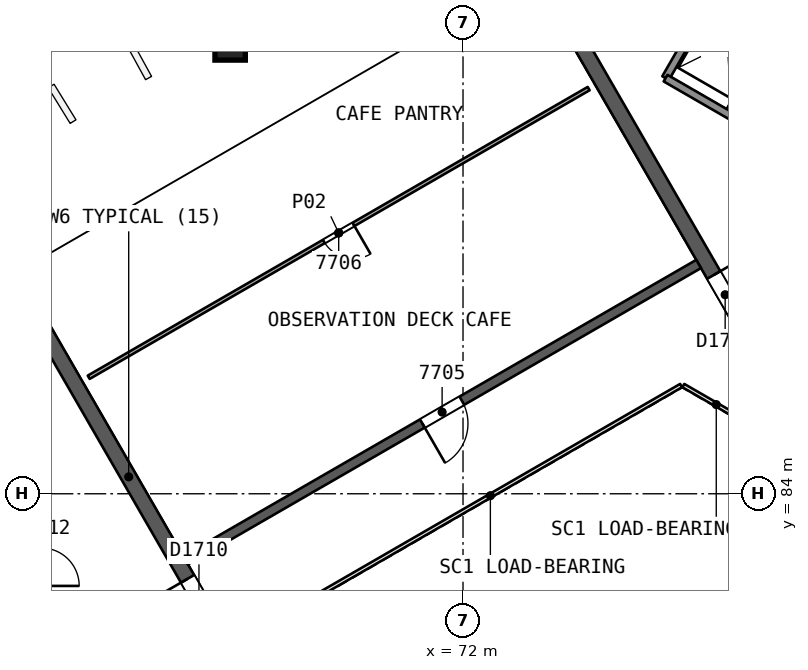
"""IFC4 building model, lengths in metres.
Left out: names, types, materials, properties, quantities, classifications, styles, units other than length and angle.
Written with IfcOpenShell. Run it as: python <this file> out.ifc"""

import sys

from ifc_helpers import new_model, si_unit, direction, frame, frame_2d, origin, origin_2d, place, context, subcontext, project, spatial, rectangle, extrude, element, fill, save


model = new_model("IFC4")
c1 = context("Model", 3, precision=1e-05, world=origin(), true_north=direction((0.0, 1.0)))
c2 = subcontext(c1, "Body", "Model", "MODEL_VIEW")
j1 = project(units=[si_unit("LENGTHUNIT", "METRE"), si_unit("PLANEANGLEUNIT", "RADIAN")], contexts=[c1])
p1 = place(None, origin())
s1 = spatial("IfcSite", under=j1, at=p1, CompositionType="ELEMENT")
p2 = place(p1, origin())
s2 = spatial("IfcBuilding", under=s1, at=p2, CompositionType="ELEMENT")
p3 = place(p2, frame((0.0, 0.0, 315.8)))
s3 = spatial("IfcBuildingStorey", under=s2, at=p3, CompositionType="ELEMENT", Elevation=315.8)
p4 = place(p3, frame((65.769, 80.0, 0.0), z_axis=(0.0, 0.0, 1.0), x_axis=(-0.50000177223, 0.866024380585, 0.0)))
e1 = element("IfcWall", 1, at=p4, inside=s3, PredefinedType="SHEAR", context=c2, shape_type="SweptSolid", body=[
    extrude(rectangle(XDim=10.265, YDim=0.4, at=frame_2d((5.132, 0.0))), origin(), (0.0, 0.0, 1.0), 6.2),
])
p5 = place(p4, frame((0.834, 0.0, 0.0)))
e2 = element("IfcOpeningElement", 2, at=p5, cuts=e1, PredefinedType="OPENING", context=c2, shape_type="SweptSolid", body=[
    extrude(rectangle(XDim=1.2, YDim=2.1, at=frame_2d((0.6, 1.05))), frame((0.0, 0.21, 0.0), z_axis=(0.0, -1.0, 0.0), x_axis=(1.0, 0.0, 0.0)), (0.0, 0.0, 1.0), 0.421),
])
p6 = place(p3, frame((74.583, 96.71, 0.0), z_axis=(0.0, 0.0, 1.0), x_axis=(0.499987488796, -0.866032627011, 0.0)))
e3 = element("IfcWall", 3, at=p6, inside=s3, PredefinedType="SHEAR", context=c2, shape_type="SweptSolid", body=[
    extrude(rectangle(XDim=10.18, YDim=0.4, at=frame_2d((5.09, 0.0))), origin(), (0.0, 0.0, 1.0), 6.2),
])
p7 = place(p6, frame((8.03, 0.0, 0.0)))
e4 = element("IfcOpeningElement", 4, at=p7, cuts=e3, PredefinedType="OPENING", context=c2, shape_type="SweptSolid", body=[
    extrude(rectangle(XDim=1.2, YDim=2.1, at=frame_2d((0.6, 1.05))), frame((0.0, 0.21, 0.0), z_axis=(0.0, -1.0, 0.0), x_axis=(1.0, 0.0, 0.0)), (0.0, 0.0, 1.0), 0.421),
])
p8 = place(p3, frame((78.2, 90.046, 0.0), z_axis=(0.0, 0.0, 1.0), x_axis=(-0.866026492143, -0.499998114903, 0.0)))
e5 = element("IfcWall", 5, at=p8, inside=s3, PredefinedType="SHEAR", context=c2, shape_type="SweptSolid", body=[
    extrude(rectangle(XDim=15.588, YDim=0.25, at=frame_2d((7.794, 0.0))), origin(), (0.0, 0.0, 1.0), 6.2),
])
p9 = place(p8, frame((7.194, 0.0, 0.0)))
e6 = element("IfcOpeningElement", 6, at=p9, cuts=e5, PredefinedType="OPENING", context=c2, shape_type="SweptSolid", body=[
    extrude(rectangle(XDim=1.2, YDim=2.4, at=frame_2d((0.6, 1.2))), frame((0.0, 0.135, 0.0), z_axis=(0.0, -1.0, 0.0), x_axis=(1.0, 0.0, 0.0)), (0.0, 0.0, 1.0), 0.271),
])
p10 = place(p3, frame((65.86, 95.831, 0.0), z_axis=(0.010064054513, -0.017499438071, 0.999796221474), x_axis=(-0.498436844032, 0.866690946639, 0.020187013797)))
e7 = element("IfcColumn", 7, at=p10, inside=s3, PredefinedType="COLUMN", context=c2, shape_type="SweptSolid", body=[
    extrude(rectangle(XDim=0.8, YDim=0.8, at=origin_2d()), origin(), (0.0, 0.0, 1.0), 6.501),
])
p11 = place(p3, frame((75.306, 94.661, 0.0), z_axis=(0.0, 0.0, 1.0), x_axis=(-0.866024999478, -0.500000700278, 0.0)))
e8 = element("IfcWall", 8, at=p11, inside=s3, PredefinedType="PARTITIONING", context=c2, shape_type="SweptSolid", body=[
    extrude(rectangle(XDim=15.19, YDim=0.1, at=frame_2d((7.595, 0.0))), origin(), (0.0, 0.0, 1.0), 6.2),
])
p12 = place(p11, frame((7.145, 0.0, 0.0)))
e9 = element("IfcOpeningElement", 9, at=p12, cuts=e8, PredefinedType="OPENING", context=c2, shape_type="SweptSolid", body=[
    extrude(rectangle(XDim=0.9, YDim=2.1, at=frame_2d((0.45, 1.05))), frame((0.0, 0.061, 0.0), z_axis=(0.0, -1.0, 0.0), x_axis=(1.0, 0.0, 0.0)), (0.0, 0.0, 1.0), 0.121),
])
for number, where, z_axis, x_axis in (
    (10, (78.976, 93.986, 0.0), (0.0, 0.0, 1.0), (0.5, 0.866, 0.0)),
    (11, (77.33, 94.936, 0.0), (0.0, 0.0, 1.0), (0.5, 0.866, 0.0)),
):
    element("IfcWall", number, at=place(p3, frame(where, z_axis=z_axis, x_axis=x_axis)), inside=s3, PredefinedType="SOLIDWALL", context=c2, shape_type="SweptSolid", body=[
        extrude(rectangle(XDim=3.05, YDim=0.2, at=frame_2d((1.525, 0.0))), origin(), (0.0, 0.0, 1.0), 6.2),
    ])
p13 = place(p3, frame((86.77, 89.486, 0.0), z_axis=(0.0, 0.0, 1.0), x_axis=(-0.86601811187, 0.500012629753, 0.0)))
e12 = element("IfcWall", 12, at=p13, inside=s3, PredefinedType="SOLIDWALL", context=c2, shape_type="SweptSolid", body=[
    extrude(rectangle(XDim=10.9, YDim=0.2, at=frame_2d((5.45, 0.0))), origin(), (0.0, 0.0, 1.0), 6.2),
])
p14 = place(p13, frame((0.625, 0.0, 0.0)))
e13 = element("IfcOpeningElement", 13, at=p14, cuts=e12, PredefinedType="OPENING", context=c2, shape_type="SweptSolid", body=[
    extrude(rectangle(XDim=1.0, YDim=2.1, at=frame_2d((0.5, 1.05))), frame((0.0, 0.11, 0.0), z_axis=(0.0, -1.0, 0.0), x_axis=(1.0, 0.0, 0.0)), (0.0, 0.0, 1.0), 0.221),
])
p15 = place(p13, frame((4.0, 0.0, 0.0)))
e14 = element("IfcOpeningElement", 14, at=p15, cuts=e12, PredefinedType="OPENING", context=c2, shape_type="SweptSolid", body=[
    extrude(rectangle(XDim=1.0, YDim=2.1, at=frame_2d((0.5, 1.05))), frame((0.0, 0.11, 0.0), z_axis=(0.0, -1.0, 0.0), x_axis=(1.0, 0.0, 0.0)), (0.0, 0.0, 1.0), 0.221),
])
p16 = place(p13, frame((7.375, 0.0, 0.0)))
e15 = element("IfcOpeningElement", 15, at=p16, cuts=e12, PredefinedType="OPENING", context=c2, shape_type="SweptSolid", body=[
    extrude(rectangle(XDim=1.0, YDim=2.1, at=frame_2d((0.5, 1.05))), frame((0.0, 0.11, 0.0), z_axis=(0.0, -1.0, 0.0), x_axis=(1.0, 0.0, 0.0)), (0.0, 0.0, 1.0), 0.221),
])
p17 = place(p3, frame((79.53, 85.846, 0.0), z_axis=(0.0, 0.0, 1.0), x_axis=(-0.866041268327, 0.499972520799, 0.0)))
e16 = element("IfcWall", 16, at=p17, inside=s3, PredefinedType="PARTITIONING", context=c2, shape_type="SweptSolid", body=[
    extrude(rectangle(XDim=2.0, YDim=0.1, at=frame_2d((1.0, 0.0))), origin(), (0.0, 0.0, 1.0), 6.2),
])
p18 = place(p3, frame((77.738, 86.846, 0.0), z_axis=(0.0, 0.0, 1.0), x_axis=(-0.866026658274, -0.499997827154, 0.0)))
e17 = element("IfcWall", 17, at=p18, inside=s3, PredefinedType="PARTITIONING", context=c2, shape_type="SweptSolid", body=[
    extrude(rectangle(XDim=11.588, YDim=0.1, at=frame_2d((5.794, 0.0))), origin(), (0.0, 0.0, 1.0), 6.2),
])
p19 = place(p9, origin())
e18 = element("IfcDoor", 18, at=p19, inside=s3, OperationType="SINGLE_SWING_RIGHT", PredefinedType="NOTDEFINED", context=c2, shape_type="SweptSolid", body=[
    extrude(rectangle(XDim=1.2, YDim=2.4, at=frame_2d((0.6, 1.2))), frame((0.0, 0.025, 0.0), z_axis=(0.0, -1.0, 0.0), x_axis=(1.0, 0.0, 0.0)), (0.0, 0.0, 1.0), 0.05),
])
fill(e6, e18)
p20 = place(p12, origin())
e19 = element("IfcDoor", 19, at=p20, inside=s3, OperationType="SINGLE_SWING_LEFT", PredefinedType="NOTDEFINED", context=c2, shape_type="SweptSolid", body=[
    extrude(rectangle(XDim=0.9, YDim=2.1, at=frame_2d((0.45, 1.05))), frame((0.0, 0.025, 0.0), z_axis=(0.0, -1.0, 0.0), x_axis=(1.0, 0.0, 0.0)), (0.0, 0.0, 1.0), 0.05),
])
fill(e9, e19)
p21 = place(p5, origin())
e20 = element("IfcDoor", 20, at=p21, inside=s3, OperationType="SINGLE_SWING_RIGHT", PredefinedType="NOTDEFINED", context=c2, shape_type="SweptSolid", body=[
    extrude(rectangle(XDim=1.2, YDim=2.1, at=frame_2d((0.6, 1.05))), frame((0.0, 0.025, 0.0), z_axis=(0.0, -1.0, 0.0), x_axis=(1.0, 0.0, 0.0)), (0.0, 0.0, 1.0), 0.05),
])
fill(e2, e20)
p22 = place(p7, origin())
e21 = element("IfcDoor", 21, at=p22, inside=s3, OperationType="SINGLE_SWING_LEFT", PredefinedType="NOTDEFINED", context=c2, shape_type="SweptSolid", body=[
    extrude(rectangle(XDim=1.2, YDim=2.1, at=frame_2d((0.6, 1.05))), frame((0.0, 0.025, 0.0), z_axis=(0.0, -1.0, 0.0), x_axis=(1.0, 0.0, 0.0)), (0.0, 0.0, 1.0), 0.05),
])
fill(e4, e21)
save(model, sys.argv[1])
